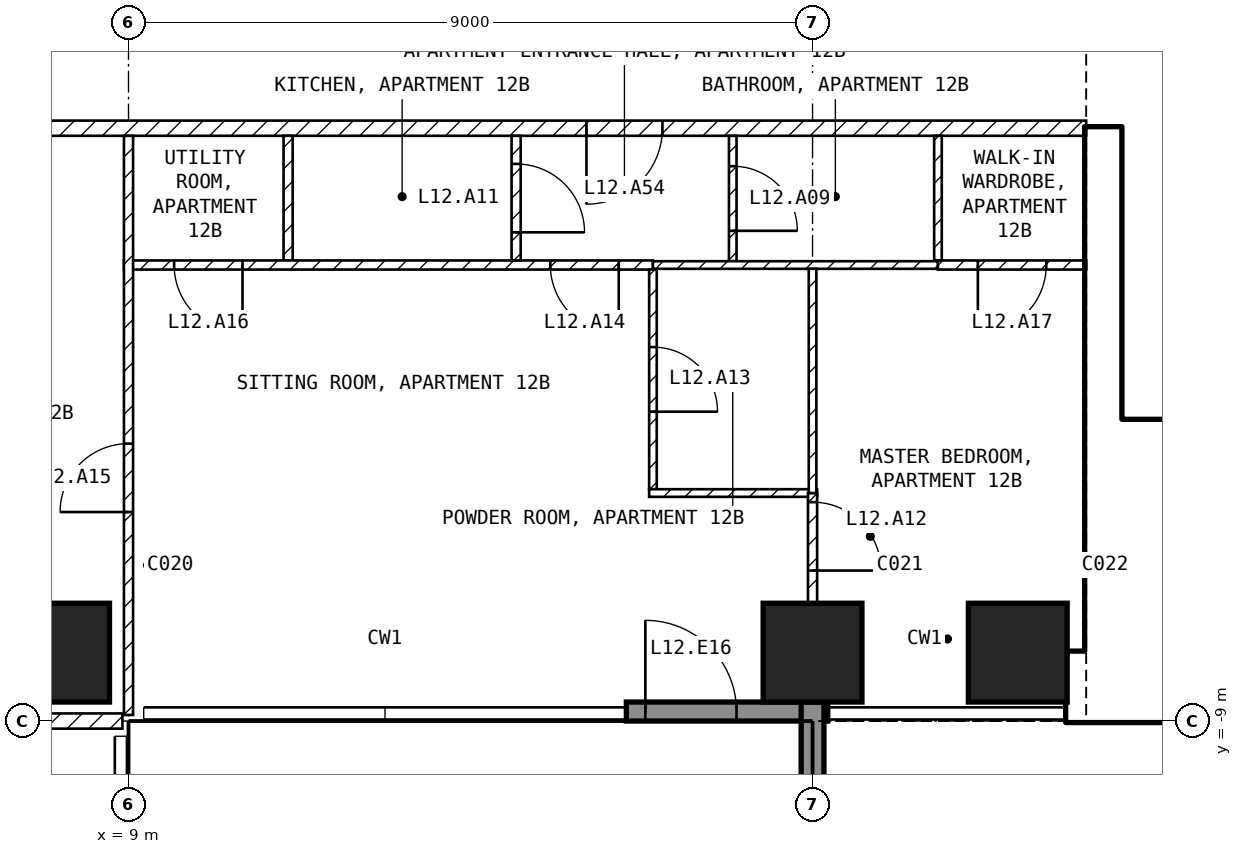
"""IFC4 building model, lengths in metres.
Left out: names, types, materials, properties, quantities, classifications, styles, units other than length and angle.
Written with IfcOpenShell. Run it as: python <this file> out.ifc"""

import sys

from ifc_helpers import new_model, si_unit, direction, frame, frame_2d, origin, origin_2d, place, context, subcontext, project, spatial, rectangle, extrude, element, fill, save


model = new_model("IFC4")
c1 = context("Model", 3, precision=1e-05, world=origin(), true_north=direction((0.0, 1.0)))
c2 = subcontext(c1, "Body", "Model", "MODEL_VIEW")
j1 = project(units=[si_unit("LENGTHUNIT", "METRE"), si_unit("PLANEANGLEUNIT", "RADIAN")], contexts=[c1])
p1 = place(None, origin())
s1 = spatial("IfcSite", under=j1, at=p1, CompositionType="ELEMENT")
p2 = place(p1, origin())
s2 = spatial("IfcBuilding", under=s1, at=p2, CompositionType="ELEMENT")
p3 = place(p2, frame((0.0, 0.0, 61.0)))
s3 = spatial("IfcBuildingStorey", under=s2, at=p3, CompositionType="ELEMENT", Elevation=61.0)
for number, where, z_axis, x_axis in (
    (1, (8.1, -8.1, -0.25), (0.0, 0.0, 1.0), (1.0, 0.0, 0.0)),
    (2, (18.0, -8.1, -0.25), (0.0, 0.0, 1.0), (1.0, 0.0, 0.0)),
    (3, (20.7, -8.1, -0.25), (0.0, 0.0, 1.0), (1.0, 0.0, 0.0)),
):
    element("IfcColumn", number, at=place(p3, frame(where, z_axis=z_axis, x_axis=x_axis)), inside=s3, PredefinedType="COLUMN", context=c2, shape_type="SweptSolid", body=[
        extrude(rectangle(XDim=1.3, YDim=1.3, at=origin_2d()), origin(), (0.0, 0.0, 1.0), 3.5),
    ])
p4 = place(p3, frame((15.55, -8.875, 0.0), z_axis=(0.0, 0.0, 1.0), x_axis=(1.0, 0.0, 0.0)))
e4 = element("IfcWall", 4, at=p4, inside=s3, PredefinedType="SOLIDWALL", context=c2, shape_type="SweptSolid", body=[
    extrude(rectangle(XDim=2.65, YDim=0.25, at=frame_2d((1.325, 0.0))), origin(), (0.0, 0.0, 1.0), 3.25),
])
p5 = place(p4, frame((0.25, 0.0, 0.0)))
e5 = element("IfcOpeningElement", 5, at=p5, cuts=e4, PredefinedType="OPENING", context=c2, shape_type="SweptSolid", body=[
    extrude(rectangle(XDim=1.2, YDim=2.4, at=frame_2d((0.6, 1.2))), frame((0.0, 0.135, 0.0), z_axis=(0.0, -1.0, 0.0), x_axis=(1.0, 0.0, 0.0)), (0.0, 0.0, 1.0), 0.27),
])
p6 = place(p3, frame((18.0, -8.75, 0.0), z_axis=(0.0, 0.0, 1.0), x_axis=(0.0, -1.0, 0.0)))
e6 = element("IfcWall", 6, at=p6, inside=s3, PredefinedType="SOLIDWALL", context=c2, shape_type="SweptSolid", body=[
    extrude(rectangle(XDim=2.95, YDim=0.3, at=frame_2d((1.475, 0.0))), origin(), (0.0, 0.0, 1.0), 3.25),
])
p7 = place(p3, frame((21.35, -8.55, 0.0), z_axis=(0.0, 0.0, 1.0), x_axis=(1.0, 0.0, 0.0)))
e7 = element("IfcWall", 7, at=p7, inside=s3, PredefinedType="SHEAR", context=c2, shape_type="SweptSolid", body=[
    extrude(rectangle(XDim=11.05, YDim=0.9, at=frame_2d((5.525, 0.0))), origin(), (0.0, 0.0, 1.0), 3.25),
])
p8 = place(p3, frame((21.825, -8.1, 0.0), z_axis=(0.0, 0.0, 1.0), x_axis=(0.0, 1.0, 0.0)))
e8 = element("IfcWall", 8, at=p8, inside=s3, PredefinedType="SHEAR", context=c2, shape_type="SweptSolid", body=[
    extrude(rectangle(XDim=6.9, YDim=0.45, at=frame_2d((3.45, 0.0))), origin(), (0.0, 0.0, 1.0), 3.25),
])
p9 = place(p3, frame((22.05, -5.15, 0.0), z_axis=(0.0, 0.0, 1.0), x_axis=(1.0, 0.0, 0.0)))
e9 = element("IfcWall", 9, at=p9, inside=s3, PredefinedType="SOLIDWALL", context=c2, shape_type="SweptSolid", body=[
    extrude(rectangle(XDim=6.3, YDim=0.2, at=frame_2d((3.15, 0.0))), origin(), (0.0, 0.0, 1.0), 3.25),
])
p10 = place(p9, frame((0.2, 0.0, 0.0)))
e10 = element("IfcOpeningElement", 10, at=p10, cuts=e9, PredefinedType="OPENING", context=c2, shape_type="SweptSolid", body=[
    extrude(rectangle(XDim=1.0, YDim=2.1, at=frame_2d((0.5, 1.05))), frame((0.0, 0.11, 0.0), z_axis=(0.0, -1.0, 0.0), x_axis=(1.0, 0.0, 0.0)), (0.0, 0.0, 1.0), 0.22),
])
p11 = place(p3, frame((21.6, -1.2, 0.0), z_axis=(0.0, 0.0, 1.0), x_axis=(-1.0, 0.0, 0.0)))
e11 = element("IfcWall", 11, at=p11, inside=s3, PredefinedType="PARTITIONING", context=c2, shape_type="SweptSolid", body=[
    extrude(rectangle(XDim=20.5, YDim=0.2, at=frame_2d((10.25, 0.0))), origin(), (0.0, 0.0, 1.0), 3.25),
])
p12 = place(p11, frame((5.575, 0.0, 0.0)))
e12 = element("IfcOpeningElement", 12, at=p12, cuts=e11, PredefinedType="OPENING", context=c2, shape_type="SweptSolid", body=[
    extrude(rectangle(XDim=1.0, YDim=2.1, at=frame_2d((0.5, 1.05))), frame((0.0, 0.11, 0.0), z_axis=(0.0, -1.0, 0.0), x_axis=(1.0, 0.0, 0.0)), (0.0, 0.0, 1.0), 0.22),
])
p13 = place(p3, frame((8.92, -9.0, 0.0), z_axis=(0.0, 0.0, 1.0), x_axis=(-1.0, 0.0, 0.0)))
e13 = element("IfcWall", 13, at=p13, inside=s3, PredefinedType="PARTITIONING", context=c2, shape_type="SweptSolid", body=[
    extrude(rectangle(XDim=17.84, YDim=0.2, at=frame_2d((8.92, 0.0))), origin(), (0.0, 0.0, 1.0), 3.25),
])
p14 = place(p13, frame((8.42, 0.0, 0.0)))
e14 = element("IfcOpeningElement", 14, at=p14, cuts=e13, PredefinedType="OPENING", context=c2, shape_type="SweptSolid", body=[
    extrude(rectangle(XDim=1.0, YDim=2.1, at=frame_2d((0.5, 1.05))), frame((0.0, 0.11, 0.0), z_axis=(0.0, -1.0, 0.0), x_axis=(1.0, 0.0, 0.0)), (0.0, 0.0, 1.0), 0.22),
])
p15 = place(p3, frame((11.1, -1.3, 0.0), z_axis=(0.0, 0.0, 1.0), x_axis=(0.0, -1.0, 0.0)))
e15 = element("IfcWall", 15, at=p15, inside=s3, PredefinedType="PARTITIONING", context=c2, shape_type="SweptSolid", body=[
    extrude(rectangle(XDim=1.64, YDim=0.12, at=frame_2d((0.82, 0.0))), origin(), (0.0, 0.0, 1.0), 3.25),
])
p16 = place(p3, frame((15.9, -3.0, 0.0), z_axis=(0.0, 0.0, 1.0), x_axis=(-1.0, 0.0, 0.0)))
e16 = element("IfcWall", 16, at=p16, inside=s3, PredefinedType="PARTITIONING", context=c2, shape_type="SweptSolid", body=[
    extrude(rectangle(XDim=6.96, YDim=0.12, at=frame_2d((3.48, 0.0))), origin(), (0.0, 0.0, 1.0), 3.25),
])
p17 = place(p16, frame((0.45, 0.0, 0.0)))
e17 = element("IfcOpeningElement", 17, at=p17, cuts=e16, PredefinedType="OPENING", context=c2, shape_type="SweptSolid", body=[
    extrude(rectangle(XDim=0.9, YDim=2.1, at=frame_2d((0.45, 1.05))), frame((0.0, 0.07, 0.0), z_axis=(0.0, -1.0, 0.0), x_axis=(1.0, 0.0, 0.0)), (0.0, 0.0, 1.0), 0.14),
])
p18 = place(p16, frame((5.4, 0.0, 0.0)))
e18 = element("IfcOpeningElement", 18, at=p18, cuts=e16, PredefinedType="OPENING", context=c2, shape_type="SweptSolid", body=[
    extrude(rectangle(XDim=0.9, YDim=2.1, at=frame_2d((0.45, 1.05))), frame((0.0, 0.07, 0.0), z_axis=(0.0, -1.0, 0.0), x_axis=(1.0, 0.0, 0.0)), (0.0, 0.0, 1.0), 0.14),
])
p19 = place(p3, frame((9.0, -8.92, 0.0), z_axis=(0.0, 0.0, 1.0), x_axis=(0.0, 1.0, 0.0)))
e19 = element("IfcWall", 19, at=p19, inside=s3, PredefinedType="PARTITIONING", context=c2, shape_type="SweptSolid", body=[
    extrude(rectangle(XDim=7.62, YDim=0.12, at=frame_2d((3.81, 0.0))), origin(), (0.0, 0.0, 1.0), 3.25),
])
p20 = place(p19, frame((2.67, 0.0, 0.0)))
e20 = element("IfcOpeningElement", 20, at=p20, cuts=e19, PredefinedType="OPENING", context=c2, shape_type="SweptSolid", body=[
    extrude(rectangle(XDim=0.9, YDim=2.1, at=frame_2d((0.45, 1.05))), frame((0.0, 0.07, 0.0), z_axis=(0.0, -1.0, 0.0), x_axis=(1.0, 0.0, 0.0)), (0.0, 0.0, 1.0), 0.14),
])
p21 = place(p3, frame((14.1, -1.3, 0.0), z_axis=(0.0, 0.0, 1.0), x_axis=(0.0, -1.0, 0.0)))
e21 = element("IfcWall", 21, at=p21, inside=s3, PredefinedType="PARTITIONING", context=c2, shape_type="SweptSolid", body=[
    extrude(rectangle(XDim=1.64, YDim=0.12, at=frame_2d((0.82, 0.0))), origin(), (0.0, 0.0, 1.0), 3.25),
])
p22 = place(p21, frame((0.37, 0.0, 0.0)))
e22 = element("IfcOpeningElement", 22, at=p22, cuts=e21, PredefinedType="OPENING", context=c2, shape_type="SweptSolid", body=[
    extrude(rectangle(XDim=0.9, YDim=2.1, at=frame_2d((0.45, 1.05))), frame((0.0, 0.07, 0.0), z_axis=(0.0, -1.0, 0.0), x_axis=(1.0, 0.0, 0.0)), (0.0, 0.0, 1.0), 0.14),
])
p23 = place(p3, frame((16.95, -1.3, 0.0), z_axis=(0.0, 0.0, 1.0), x_axis=(0.0, -1.0, 0.0)))
e23 = element("IfcWall", 23, at=p23, inside=s3, PredefinedType="PARTITIONING", context=c2, shape_type="SweptSolid", body=[
    extrude(rectangle(XDim=1.65, YDim=0.1, at=frame_2d((0.825, 0.0))), origin(), (0.0, 0.0, 1.0), 3.25),
])
p24 = place(p23, frame((0.4, 0.0, 0.0)))
e24 = element("IfcOpeningElement", 24, at=p24, cuts=e23, PredefinedType="OPENING", context=c2, shape_type="SweptSolid", body=[
    extrude(rectangle(XDim=0.85, YDim=2.1, at=frame_2d((0.425, 1.05))), frame((0.0, 0.06, 0.0), z_axis=(0.0, -1.0, 0.0), x_axis=(1.0, 0.0, 0.0)), (0.0, 0.0, 1.0), 0.12),
])
p25 = place(p3, frame((19.65, -3.0, 0.0), z_axis=(0.0, 0.0, 1.0), x_axis=(-1.0, 0.0, 0.0)))
e25 = element("IfcWall", 25, at=p25, inside=s3, PredefinedType="PARTITIONING", context=c2, shape_type="SweptSolid", body=[
    extrude(rectangle(XDim=3.75, YDim=0.1, at=frame_2d((1.875, 0.0))), origin(), (0.0, 0.0, 1.0), 3.25),
])
p26 = place(p3, frame((19.65, -1.3, 0.0), z_axis=(0.0, 0.0, 1.0), x_axis=(0.0, -1.0, 0.0)))
e26 = element("IfcWall", 26, at=p26, inside=s3, PredefinedType="PARTITIONING", context=c2, shape_type="SweptSolid", body=[
    extrude(rectangle(XDim=1.64, YDim=0.1, at=frame_2d((0.82, 0.0))), origin(), (0.0, 0.0, 1.0), 3.25),
])
p27 = place(p3, frame((21.6, -3.0, 0.0), z_axis=(0.0, 0.0, 1.0), x_axis=(-1.0, 0.0, 0.0)))
e27 = element("IfcWall", 27, at=p27, inside=s3, PredefinedType="PARTITIONING", context=c2, shape_type="SweptSolid", body=[
    extrude(rectangle(XDim=1.95, YDim=0.12, at=frame_2d((0.975, 0.0))), origin(), (0.0, 0.0, 1.0), 3.25),
])
p28 = place(p27, frame((0.525, 0.0, 0.0)))
e28 = element("IfcOpeningElement", 28, at=p28, cuts=e27, PredefinedType="OPENING", context=c2, shape_type="SweptSolid", body=[
    extrude(rectangle(XDim=0.9, YDim=2.1, at=frame_2d((0.45, 1.05))), frame((0.0, 0.07, 0.0), z_axis=(0.0, -1.0, 0.0), x_axis=(1.0, 0.0, 0.0)), (0.0, 0.0, 1.0), 0.14),
])
p29 = place(p3, frame((15.9, -3.06, 0.0), z_axis=(0.0, 0.0, 1.0), x_axis=(0.0, -1.0, 0.0)))
e29 = element("IfcWall", 29, at=p29, inside=s3, PredefinedType="PARTITIONING", context=c2, shape_type="SweptSolid", body=[
    extrude(rectangle(XDim=2.89, YDim=0.1, at=frame_2d((1.445, 0.0))), origin(), (0.0, 0.0, 1.0), 3.25),
])
p30 = place(p29, frame((1.02, 0.0, 0.0)))
e30 = element("IfcOpeningElement", 30, at=p30, cuts=e29, PredefinedType="OPENING", context=c2, shape_type="SweptSolid", body=[
    extrude(rectangle(XDim=0.85, YDim=2.1, at=frame_2d((0.425, 1.05))), frame((0.0, 0.06, 0.0), z_axis=(0.0, -1.0, 0.0), x_axis=(1.0, 0.0, 0.0)), (0.0, 0.0, 1.0), 0.12),
])
p31 = place(p3, frame((15.85, -6.0, 0.0), z_axis=(0.0, 0.0, 1.0), x_axis=(1.0, 0.0, 0.0)))
e31 = element("IfcWall", 31, at=p31, inside=s3, PredefinedType="PARTITIONING", context=c2, shape_type="SweptSolid", body=[
    extrude(rectangle(XDim=2.21, YDim=0.1, at=frame_2d((1.105, 0.0))), origin(), (0.0, 0.0, 1.0), 3.25),
])
p32 = place(p3, frame((18.0, -6.0, 0.0), z_axis=(0.0, 0.0, 1.0), x_axis=(0.0, -1.0, 0.0)))
e32 = element("IfcWall", 32, at=p32, inside=s3, PredefinedType="PARTITIONING", context=c2, shape_type="SweptSolid", body=[
    extrude(rectangle(XDim=1.45, YDim=0.12, at=frame_2d((0.725, 0.0))), origin(), (0.0, 0.0, 1.0), 2.346),
])
p33 = place(p32, frame((0.12, 0.0, 0.0)))
e33 = element("IfcOpeningElement", 33, at=p33, cuts=e32, PredefinedType="OPENING", context=c2, shape_type="SweptSolid", body=[
    extrude(rectangle(XDim=0.9, YDim=2.1, at=frame_2d((0.45, 1.05))), frame((0.0, 0.07, 0.0), z_axis=(0.0, -1.0, 0.0), x_axis=(1.0, 0.0, 0.0)), (0.0, 0.0, 1.0), 0.14),
])
p34 = place(p3, frame((18.0, -3.05, 0.0), z_axis=(0.0, 0.0, 1.0), x_axis=(0.0, -1.0, 0.0)))
e34 = element("IfcWall", 34, at=p34, inside=s3, PredefinedType="PARTITIONING", context=c2, shape_type="SweptSolid", body=[
    extrude(rectangle(XDim=2.95, YDim=0.1, at=frame_2d((1.475, 0.0))), origin(), (0.0, 0.0, 1.0), 2.346),
])
p35 = place(p5, origin())
e35 = element("IfcDoor", 35, at=p35, inside=s3, OperationType="SINGLE_SWING_LEFT", PredefinedType="DOOR", context=c2, shape_type="SweptSolid", body=[
    extrude(rectangle(XDim=1.2, YDim=2.4, at=frame_2d((0.6, 1.2))), frame((0.0, 0.025, 0.0), z_axis=(0.0, -1.0, 0.0), x_axis=(1.0, 0.0, 0.0)), (0.0, 0.0, 1.0), 0.05),
])
fill(e5, e35)
p36 = place(p10, origin())
e36 = element("IfcDoor", 36, at=p36, inside=s3, OperationType="SINGLE_SWING_LEFT", PredefinedType="DOOR", context=c2, shape_type="SweptSolid", body=[
    extrude(rectangle(XDim=1.0, YDim=2.1, at=frame_2d((0.5, 1.05))), frame((0.0, 0.025, 0.0), z_axis=(0.0, -1.0, 0.0), x_axis=(1.0, 0.0, 0.0)), (0.0, 0.0, 1.0), 0.05),
])
fill(e10, e36)
p37 = place(p24, origin())
e37 = element("IfcDoor", 37, at=p37, inside=s3, OperationType="SINGLE_SWING_RIGHT", PredefinedType="DOOR", context=c2, shape_type="SweptSolid", body=[
    extrude(rectangle(XDim=0.85, YDim=2.1, at=frame_2d((0.425, 1.05))), frame((0.0, 0.025, 0.0), z_axis=(0.0, -1.0, 0.0), x_axis=(1.0, 0.0, 0.0)), (0.0, 0.0, 1.0), 0.05),
])
fill(e24, e37)
p38 = place(p22, origin())
e38 = element("IfcDoor", 38, at=p38, inside=s3, OperationType="SINGLE_SWING_RIGHT", PredefinedType="DOOR", context=c2, shape_type="SweptSolid", body=[
    extrude(rectangle(XDim=0.9, YDim=2.1, at=frame_2d((0.45, 1.05))), frame((0.0, 0.025, 0.0), z_axis=(0.0, -1.0, 0.0), x_axis=(1.0, 0.0, 0.0)), (0.0, 0.0, 1.0), 0.05),
])
fill(e22, e38)
p39 = place(p33, origin())
e39 = element("IfcDoor", 39, at=p39, inside=s3, OperationType="SINGLE_SWING_RIGHT", PredefinedType="DOOR", context=c2, shape_type="SweptSolid", body=[
    extrude(rectangle(XDim=0.9, YDim=2.1, at=frame_2d((0.45, 1.05))), frame((0.0, 0.025, 0.0), z_axis=(0.0, -1.0, 0.0), x_axis=(1.0, 0.0, 0.0)), (0.0, 0.0, 1.0), 0.05),
])
fill(e33, e39)
p40 = place(p30, origin())
e40 = element("IfcDoor", 40, at=p40, inside=s3, OperationType="SINGLE_SWING_RIGHT", PredefinedType="DOOR", context=c2, shape_type="SweptSolid", body=[
    extrude(rectangle(XDim=0.85, YDim=2.1, at=frame_2d((0.425, 1.05))), frame((0.0, 0.025, 0.0), z_axis=(0.0, -1.0, 0.0), x_axis=(1.0, 0.0, 0.0)), (0.0, 0.0, 1.0), 0.05),
])
fill(e30, e40)
p41 = place(p17, origin())
e41 = element("IfcDoor", 41, at=p41, inside=s3, OperationType="SINGLE_SWING_LEFT", PredefinedType="DOOR", context=c2, shape_type="SweptSolid", body=[
    extrude(rectangle(XDim=0.9, YDim=2.1, at=frame_2d((0.45, 1.05))), frame((0.0, 0.025, 0.0), z_axis=(0.0, -1.0, 0.0), x_axis=(1.0, 0.0, 0.0)), (0.0, 0.0, 1.0), 0.05),
])
fill(e17, e41)
p42 = place(p20, origin())
e42 = element("IfcDoor", 42, at=p42, inside=s3, OperationType="SINGLE_SWING_LEFT", PredefinedType="DOOR", context=c2, shape_type="SweptSolid", body=[
    extrude(rectangle(XDim=0.9, YDim=2.1, at=frame_2d((0.45, 1.05))), frame((0.0, 0.025, 0.0), z_axis=(0.0, -1.0, 0.0), x_axis=(1.0, 0.0, 0.0)), (0.0, 0.0, 1.0), 0.05),
])
fill(e20, e42)
p43 = place(p18, origin())
e43 = element("IfcDoor", 43, at=p43, inside=s3, OperationType="SINGLE_SWING_LEFT", PredefinedType="DOOR", context=c2, shape_type="SweptSolid", body=[
    extrude(rectangle(XDim=0.9, YDim=2.1, at=frame_2d((0.45, 1.05))), frame((0.0, 0.025, 0.0), z_axis=(0.0, -1.0, 0.0), x_axis=(1.0, 0.0, 0.0)), (0.0, 0.0, 1.0), 0.05),
])
fill(e18, e43)
p44 = place(p28, origin())
e44 = element("IfcDoor", 44, at=p44, inside=s3, OperationType="SINGLE_SWING_RIGHT", PredefinedType="DOOR", context=c2, shape_type="SweptSolid", body=[
    extrude(rectangle(XDim=0.9, YDim=2.1, at=frame_2d((0.45, 1.05))), frame((0.0, 0.025, 0.0), z_axis=(0.0, -1.0, 0.0), x_axis=(1.0, 0.0, 0.0)), (0.0, 0.0, 1.0), 0.05),
])
fill(e28, e44)
p45 = place(p12, origin())
e45 = element("IfcDoor", 45, at=p45, inside=s3, OperationType="SINGLE_SWING_RIGHT", PredefinedType="DOOR", context=c2, shape_type="SweptSolid", body=[
    extrude(rectangle(XDim=1.0, YDim=2.1, at=frame_2d((0.5, 1.05))), frame((0.0, 0.025, 0.0), z_axis=(0.0, -1.0, 0.0), x_axis=(1.0, 0.0, 0.0)), (0.0, 0.0, 1.0), 0.05),
])
fill(e12, e45)
save(model, sys.argv[1])
